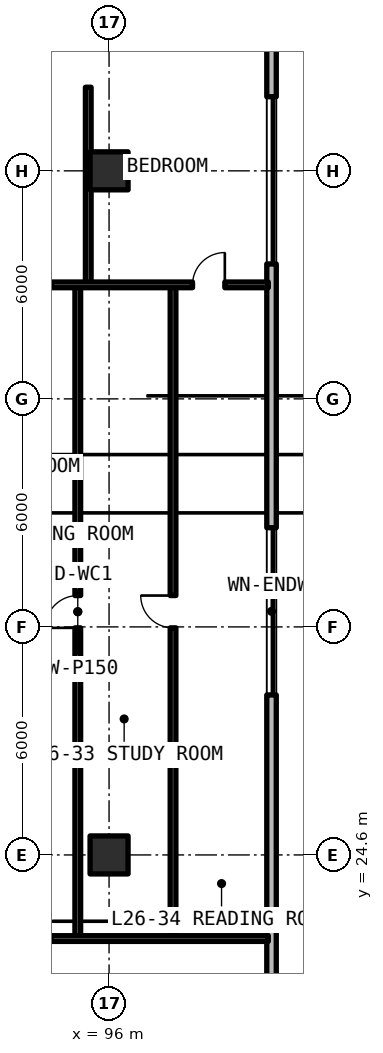
"""IFC4 building model, lengths in metres.
Left out: names, types, materials, properties, quantities, classifications, styles, units other than length and angle.
Written with IfcOpenShell. Run it as: python <this file> out.ifc"""

import sys

from ifc_helpers import new_model, si_unit, direction, frame, frame_2d, origin, origin_2d, place, context, subcontext, project, spatial, rectangle, extrude, element, fill, save


model = new_model("IFC4")
c1 = context("Model", 3, precision=1e-05, world=origin(), true_north=direction((0.0, 1.0)))
c2 = subcontext(c1, "Body", "Model", "MODEL_VIEW")
j1 = project(units=[si_unit("LENGTHUNIT", "METRE"), si_unit("PLANEANGLEUNIT", "RADIAN")], contexts=[c1])
p1 = place(None, origin())
s1 = spatial("IfcSite", under=j1, at=p1, CompositionType="ELEMENT")
p2 = place(p1, origin())
s2 = spatial("IfcBuilding", under=s1, at=p2, CompositionType="ELEMENT")
p3 = place(p2, frame((0.0, 0.0, 95.37)))
s3 = spatial("IfcBuildingStorey", under=s2, at=p3, CompositionType="ELEMENT", Elevation=95.37)
for number, where, z_axis, x_axis in (
    (1, (96.0, 24.6, 0.0), (0.0, 0.0, 1.0), (1.0, 0.0, 0.0)),
    (2, (96.0, 42.6, 0.0), (0.0, 0.0, 1.0), (1.0, 0.0, 0.0)),
):
    element("IfcColumn", number, at=place(p3, frame(where, z_axis=z_axis, x_axis=x_axis)), inside=s3, PredefinedType="COLUMN", context=c2, shape_type="SweptSolid", body=[
        extrude(rectangle(XDim=1.0, YDim=1.0, at=origin_2d()), origin(), (0.0, 0.0, 1.0), 3.3),
    ])
p4 = place(p3, frame((100.275, 13.852, 0.0), z_axis=(0.0, 0.0, 1.0), x_axis=(0.0, 1.0, 0.0)))
e3 = element("IfcWall", 3, at=p4, inside=s3, PredefinedType="SOLIDWALL", context=c2, shape_type="SweptSolid", body=[
    extrude(rectangle(XDim=39.496, YDim=0.25, at=frame_2d((19.748, 0.0))), origin(), (0.0, 0.0, 1.0), 3.08),
])
p5 = place(p4, frame((1.948, 0.0, 0.0)))
e4 = element("IfcOpeningElement", 4, at=p5, cuts=e3, PredefinedType="OPENING", context=c2, shape_type="SweptSolid", body=[
    extrude(rectangle(XDim=1.1, YDim=2.15, at=frame_2d((0.55, 1.075))), frame((0.0, 0.135, 0.0), z_axis=(0.0, -1.0, 0.0), x_axis=(1.0, 0.0, 0.0)), (0.0, 0.0, 1.0), 0.27),
])
p6 = place(p4, frame((14.958, 0.0, 0.78)))
e5 = element("IfcOpeningElement", 5, at=p6, cuts=e3, PredefinedType="OPENING", context=c2, shape_type="SweptSolid", body=[
    extrude(rectangle(XDim=4.4, YDim=1.66, at=frame_2d((2.2, 0.83))), frame((0.0, 0.135, 0.0), z_axis=(0.0, -1.0, 0.0), x_axis=(1.0, 0.0, 0.0)), (0.0, 0.0, 1.0), 0.27),
])
p7 = place(p4, frame((26.298, 0.0, 0.78)))
e6 = element("IfcOpeningElement", 6, at=p7, cuts=e3, PredefinedType="OPENING", context=c2, shape_type="SweptSolid", body=[
    extrude(rectangle(XDim=4.4, YDim=1.66, at=frame_2d((2.2, 0.83))), frame((0.0, 0.135, 0.0), z_axis=(0.0, -1.0, 0.0), x_axis=(1.0, 0.0, 0.0)), (0.0, 0.0, 1.0), 0.27),
])
p8 = place(p3, frame((95.177, 22.4, 0.0), z_axis=(0.0, 0.0, 1.0), x_axis=(0.0, 1.0, 0.0)))
e7 = element("IfcWall", 7, at=p8, inside=s3, PredefinedType="PARTITIONING", context=c2, shape_type="SweptSolid", body=[
    extrude(rectangle(XDim=17.2, YDim=0.15, at=frame_2d((8.6, 0.0))), origin(), (0.0, 0.0, 1.0), 2.35),
])
p9 = place(p8, frame((8.175, 0.0, 0.0)))
e8 = element("IfcOpeningElement", 8, at=p9, cuts=e7, PredefinedType="OPENING", context=c2, shape_type="SweptSolid", body=[
    extrude(rectangle(XDim=0.85, YDim=2.1, at=frame_2d((0.425, 1.05))), frame((0.0, 0.085, 0.0), z_axis=(0.0, -1.0, 0.0), x_axis=(1.0, 0.0, 0.0)), (0.0, 0.0, 1.0), 0.17),
])
p10 = place(p3, frame((97.683, 22.4, 0.0), z_axis=(0.0, 0.0, 1.0), x_axis=(0.0, 1.0, 0.0)))
e9 = element("IfcWall", 9, at=p10, inside=s3, PredefinedType="PARTITIONING", context=c2, shape_type="SweptSolid", body=[
    extrude(rectangle(XDim=17.2, YDim=0.15, at=frame_2d((8.6, 0.0))), origin(), (0.0, 0.0, 1.0), 2.35),
])
p11 = place(p10, frame((8.175, 0.0, 0.0)))
e10 = element("IfcOpeningElement", 10, at=p11, cuts=e9, PredefinedType="OPENING", context=c2, shape_type="SweptSolid", body=[
    extrude(rectangle(XDim=0.85, YDim=2.1, at=frame_2d((0.425, 1.05))), frame((0.0, 0.085, 0.0), z_axis=(0.0, -1.0, 0.0), x_axis=(1.0, 0.0, 0.0)), (0.0, 0.0, 1.0), 0.17),
])
p12 = place(p3, frame((95.452, 39.6, 0.0), z_axis=(0.0, 0.0, 1.0), x_axis=(0.0, 1.0, 0.0)))
e11 = element("IfcWall", 11, at=p12, inside=s3, PredefinedType="PARTITIONING", context=c2, shape_type="SweptSolid", body=[
    extrude(rectangle(XDim=5.2, YDim=0.15, at=frame_2d((2.6, 0.0))), origin(), (0.0, 0.0, 1.0), 2.35),
])
p13 = place(p3, frame((90.32, 39.6, 0.0), z_axis=(0.0, 0.0, 1.0), x_axis=(1.0, 0.0, 0.0)))
e12 = element("IfcWall", 12, at=p13, inside=s3, PredefinedType="PARTITIONING", context=c2, shape_type="SweptSolid", body=[
    extrude(rectangle(XDim=9.87, YDim=0.15, at=frame_2d((4.935, 0.0))), origin(), (0.0, 0.0, 1.0), 2.35),
])
p14 = place(p13, frame((3.316, 0.0, 0.0)))
e13 = element("IfcOpeningElement", 13, at=p14, cuts=e12, PredefinedType="OPENING", context=c2, shape_type="SweptSolid", body=[
    extrude(rectangle(XDim=0.85, YDim=2.1, at=frame_2d((0.425, 1.05))), frame((0.0, 0.085, 0.0), z_axis=(0.0, -1.0, 0.0), x_axis=(1.0, 0.0, 0.0)), (0.0, 0.0, 1.0), 0.17),
])
p15 = place(p13, frame((7.876, 0.0, 0.0)))
e14 = element("IfcOpeningElement", 14, at=p15, cuts=e12, PredefinedType="OPENING", context=c2, shape_type="SweptSolid", body=[
    extrude(rectangle(XDim=0.85, YDim=2.1, at=frame_2d((0.425, 1.05))), frame((0.0, 0.085, 0.0), z_axis=(0.0, -1.0, 0.0), x_axis=(1.0, 0.0, 0.0)), (0.0, 0.0, 1.0), 0.17),
])
p16 = place(p3, frame((90.32, 22.4, 0.0), z_axis=(0.0, 0.0, 1.0), x_axis=(1.0, 0.0, 0.0)))
e15 = element("IfcWall", 15, at=p16, inside=s3, PredefinedType="SOLIDWALL", context=c2, shape_type="SweptSolid", body=[
    extrude(rectangle(XDim=9.87, YDim=0.15, at=frame_2d((4.935, 0.0))), origin(), (0.0, 0.0, 1.0), 2.35),
])
p17 = place(p16, frame((3.193, 0.0, 0.0)))
e16 = element("IfcOpeningElement", 16, at=p17, cuts=e15, PredefinedType="OPENING", context=c2, shape_type="SweptSolid", body=[
    extrude(rectangle(XDim=0.95, YDim=2.15, at=frame_2d((0.475, 1.075))), frame((0.0, 0.085, 0.0), z_axis=(0.0, -1.0, 0.0), x_axis=(1.0, 0.0, 0.0)), (0.0, 0.0, 1.0), 0.17),
])
p18 = place(p6, origin())
e17 = element("IfcWindow", 17, at=p18, inside=s3, PartitioningType="SINGLE_PANEL", PredefinedType="WINDOW", context=c2, shape_type="SweptSolid", body=[
    extrude(rectangle(XDim=4.4, YDim=1.66, at=frame_2d((2.2, 0.83))), frame((0.0, 0.03, 0.0), z_axis=(0.0, -1.0, 0.0), x_axis=(1.0, 0.0, 0.0)), (0.0, 0.0, 1.0), 0.06),
])
fill(e5, e17)
p19 = place(p7, origin())
e18 = element("IfcWindow", 18, at=p19, inside=s3, PartitioningType="SINGLE_PANEL", PredefinedType="WINDOW", context=c2, shape_type="SweptSolid", body=[
    extrude(rectangle(XDim=4.4, YDim=1.66, at=frame_2d((2.2, 0.83))), frame((0.0, 0.03, 0.0), z_axis=(0.0, -1.0, 0.0), x_axis=(1.0, 0.0, 0.0)), (0.0, 0.0, 1.0), 0.06),
])
fill(e6, e18)
p20 = place(p9, origin())
e19 = element("IfcDoor", 19, at=p20, inside=s3, OperationType="SINGLE_SWING_LEFT", PredefinedType="DOOR", context=c2, shape_type="SweptSolid", body=[
    extrude(rectangle(XDim=0.85, YDim=2.1, at=frame_2d((0.425, 1.05))), frame((0.0, 0.025, 0.0), z_axis=(0.0, -1.0, 0.0), x_axis=(1.0, 0.0, 0.0)), (0.0, 0.0, 1.0), 0.05),
])
fill(e8, e19)
p21 = place(p11, origin())
e20 = element("IfcDoor", 20, at=p21, inside=s3, OperationType="SINGLE_SWING_RIGHT", PredefinedType="DOOR", context=c2, shape_type="SweptSolid", body=[
    extrude(rectangle(XDim=0.85, YDim=2.1, at=frame_2d((0.425, 1.05))), frame((0.0, 0.025, 0.0), z_axis=(0.0, -1.0, 0.0), x_axis=(1.0, 0.0, 0.0)), (0.0, 0.0, 1.0), 0.05),
])
fill(e10, e20)
p22 = place(p15, origin())
e21 = element("IfcDoor", 21, at=p22, inside=s3, OperationType="SINGLE_SWING_RIGHT", PredefinedType="DOOR", context=c2, shape_type="SweptSolid", body=[
    extrude(rectangle(XDim=0.85, YDim=2.1, at=frame_2d((0.425, 1.05))), frame((0.0, 0.025, 0.0), z_axis=(0.0, -1.0, 0.0), x_axis=(1.0, 0.0, 0.0)), (0.0, 0.0, 1.0), 0.05),
])
fill(e14, e21)
save(model, sys.argv[1])
